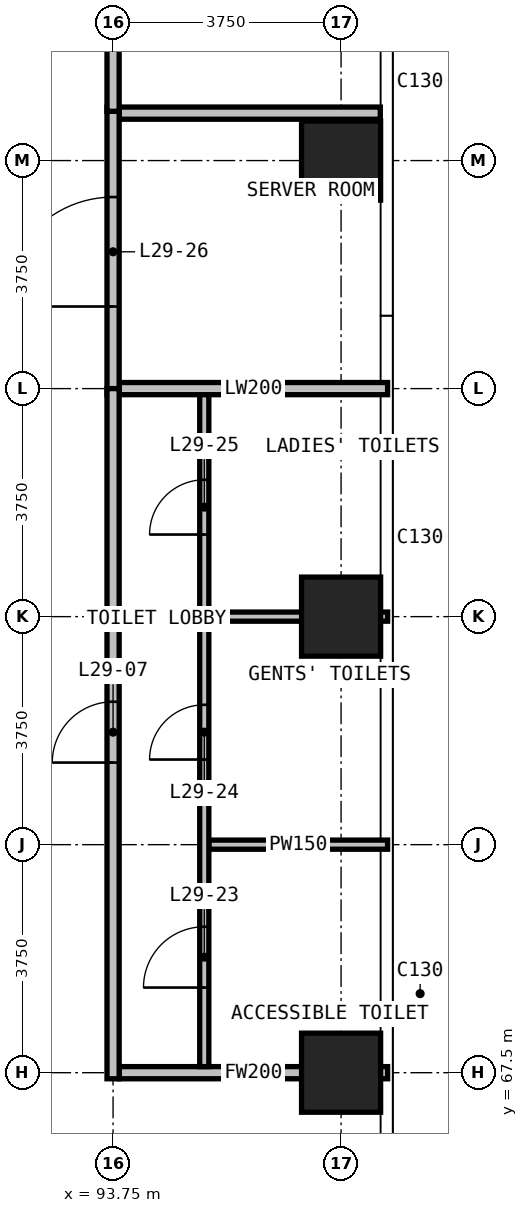
"""IFC4 building model, lengths in metres.
Left out: names, types, materials, properties, quantities, classifications, styles, units other than length and angle.
Written with IfcOpenShell. Run it as: python <this file> out.ifc"""

import sys

from ifc_helpers import new_model, si_unit, direction, frame, frame_2d, origin, origin_2d, place, context, subcontext, project, spatial, rectangle, extrude, element, fill, save


model = new_model("IFC4")
c1 = context("Model", 3, precision=1e-05, world=origin(), true_north=direction((0.0, 1.0)))
c2 = subcontext(c1, "Body", "Model", "MODEL_VIEW")
j1 = project(units=[si_unit("LENGTHUNIT", "METRE"), si_unit("PLANEANGLEUNIT", "RADIAN")], contexts=[c1])
p1 = place(None, origin())
s1 = spatial("IfcSite", under=j1, at=p1, CompositionType="ELEMENT")
p2 = place(p1, origin())
s2 = spatial("IfcBuilding", under=s1, at=p2, CompositionType="ELEMENT")
p3 = place(p2, frame((0.0, 0.0, 118.0)))
s3 = spatial("IfcBuildingStorey", under=s2, at=p3, CompositionType="ELEMENT", Elevation=118.0)
for number, where, z_axis, x_axis in (
    (1, (97.5, 67.5, 0.0), (0.0, 0.0, 1.0), (1.0, 0.0, 0.0)),
    (2, (97.5, 75.0, 0.0), (0.0, 0.0, 1.0), (1.0, 0.0, 0.0)),
    (3, (97.5, 82.5, 0.0), (0.0, 0.0, 1.0), (1.0, 0.0, 0.0)),
):
    element("IfcColumn", number, at=place(p3, frame(where, z_axis=z_axis, x_axis=x_axis)), inside=s3, PredefinedType="COLUMN", context=c2, shape_type="SweptSolid", body=[
        extrude(rectangle(XDim=1.3, YDim=1.3, at=origin_2d()), origin(), (0.0, 0.0, 1.0), 3.6),
    ])
p4 = place(p3, frame((93.85, 78.75, 0.0), z_axis=(0.0, 0.0, 1.0), x_axis=(1.0, 0.0, 0.0)))
e4 = element("IfcWall", 4, at=p4, inside=s3, PredefinedType="PARTITIONING", context=c2, shape_type="SweptSolid", body=[
    extrude(rectangle(XDim=4.415, YDim=0.2, at=frame_2d((2.208, 0.0))), origin(), (0.0, 0.0, 1.0), 3.3),
])
p5 = place(p3, frame((93.85, 83.28, 0.0), z_axis=(0.0, 0.0, 1.0), x_axis=(1.0, 0.0, 0.0)))
e5 = element("IfcWall", 5, at=p5, inside=s3, PredefinedType="PARTITIONING", context=c2, shape_type="SweptSolid", body=[
    extrude(rectangle(XDim=4.295, YDim=0.2, at=frame_2d((2.147, 0.0))), origin(), (0.0, 0.0, 1.0), 3.3),
])
p6 = place(p3, frame((93.75, 78.65, 0.0), z_axis=(0.0, 0.0, 1.0), x_axis=(0.0, 1.0, 0.0)))
e6 = element("IfcWall", 6, at=p6, inside=s3, PredefinedType="PARTITIONING", context=c2, shape_type="SweptSolid", body=[
    extrude(rectangle(XDim=4.73, YDim=0.2, at=frame_2d((2.365, 0.0))), origin(), (0.0, 0.0, 1.0), 3.3),
])
p7 = place(p6, frame((1.45, 0.0, 0.0)))
e7 = element("IfcOpeningElement", 7, at=p7, cuts=e6, PredefinedType="OPENING", context=c2, shape_type="SweptSolid", body=[
    extrude(rectangle(XDim=1.8, YDim=2.4, at=frame_2d((0.9, 1.2))), frame((0.0, 0.11, 0.0), z_axis=(0.0, -1.0, 0.0), x_axis=(1.0, 0.0, 0.0)), (0.0, 0.0, 1.0), 0.22),
])
p8 = place(p3, frame((93.85, 67.5, 0.0), z_axis=(0.0, 0.0, 1.0), x_axis=(1.0, 0.0, 0.0)))
e8 = element("IfcWall", 8, at=p8, inside=s3, PredefinedType="PARTITIONING", context=c2, shape_type="SweptSolid", body=[
    extrude(rectangle(XDim=4.415, YDim=0.2, at=frame_2d((2.208, 0.0))), origin(), (0.0, 0.0, 1.0), 3.3),
])
p9 = place(p3, frame((93.75, 67.4, 0.0), z_axis=(0.0, 0.0, 1.0), x_axis=(0.0, 1.0, 0.0)))
e9 = element("IfcWall", 9, at=p9, inside=s3, PredefinedType="PARTITIONING", context=c2, shape_type="SweptSolid", body=[
    extrude(rectangle(XDim=11.35, YDim=0.2, at=frame_2d((5.675, 0.0))), origin(), (0.0, 0.0, 1.0), 3.3),
])
p10 = place(p9, frame((5.2, 0.0, 0.0)))
e10 = element("IfcOpeningElement", 10, at=p10, cuts=e9, PredefinedType="OPENING", context=c2, shape_type="SweptSolid", body=[
    extrude(rectangle(XDim=1.0, YDim=2.2, at=frame_2d((0.5, 1.1))), frame((0.0, 0.11, 0.0), z_axis=(0.0, -1.0, 0.0), x_axis=(1.0, 0.0, 0.0)), (0.0, 0.0, 1.0), 0.22),
])
p11 = place(p3, frame((93.75, 83.31, 0.0), z_axis=(0.0, 0.0, 1.0), x_axis=(0.0, 1.0, 0.0)))
e11 = element("IfcWall", 11, at=p11, inside=s3, PredefinedType="PARTITIONING", context=c2, shape_type="SweptSolid", body=[
    extrude(rectangle(XDim=7.335, YDim=0.2, at=frame_2d((3.667, 0.0))), origin(), (0.0, 0.0, 1.0), 3.3),
])
for number, where, z_axis, x_axis in (
    (12, (95.325, 71.25, 0.0), (0.0, 0.0, 1.0), (1.0, 0.0, 0.0)),
    (13, (95.325, 75.0, 0.0), (0.0, 0.0, 1.0), (1.0, 0.0, 0.0)),
):
    element("IfcWall", number, at=place(p3, frame(where, z_axis=z_axis, x_axis=x_axis)), inside=s3, PredefinedType="PARTITIONING", context=c2, shape_type="SweptSolid", body=[
        extrude(rectangle(XDim=2.94, YDim=0.15, at=frame_2d((1.47, 0.0))), origin(), (0.0, 0.0, 1.0), 3.3),
    ])
p12 = place(p3, frame((95.25, 67.6, 0.0), z_axis=(0.0, 0.0, 1.0), x_axis=(0.0, 1.0, 0.0)))
e14 = element("IfcWall", 14, at=p12, inside=s3, PredefinedType="PARTITIONING", context=c2, shape_type="SweptSolid", body=[
    extrude(rectangle(XDim=11.05, YDim=0.15, at=frame_2d((5.525, 0.0))), origin(), (0.0, 0.0, 1.0), 3.3),
])
p13 = place(p12, frame((1.3, 0.0, 0.0)))
e15 = element("IfcOpeningElement", 15, at=p13, cuts=e14, PredefinedType="OPENING", context=c2, shape_type="SweptSolid", body=[
    extrude(rectangle(XDim=1.0, YDim=2.2, at=frame_2d((0.5, 1.1))), frame((0.0, 0.085, 0.0), z_axis=(0.0, -1.0, 0.0), x_axis=(1.0, 0.0, 0.0)), (0.0, 0.0, 1.0), 0.17),
])
p14 = place(p12, frame((5.05, 0.0, 0.0)))
e16 = element("IfcOpeningElement", 16, at=p14, cuts=e14, PredefinedType="OPENING", context=c2, shape_type="SweptSolid", body=[
    extrude(rectangle(XDim=0.9, YDim=2.2, at=frame_2d((0.45, 1.1))), frame((0.0, 0.085, 0.0), z_axis=(0.0, -1.0, 0.0), x_axis=(1.0, 0.0, 0.0)), (0.0, 0.0, 1.0), 0.17),
])
p15 = place(p12, frame((8.75, 0.0, 0.0)))
e17 = element("IfcOpeningElement", 17, at=p15, cuts=e14, PredefinedType="OPENING", context=c2, shape_type="SweptSolid", body=[
    extrude(rectangle(XDim=0.9, YDim=2.2, at=frame_2d((0.45, 1.1))), frame((0.0, 0.085, 0.0), z_axis=(0.0, -1.0, 0.0), x_axis=(1.0, 0.0, 0.0)), (0.0, 0.0, 1.0), 0.17),
])
p16 = place(p10, origin())
e18 = element("IfcDoor", 18, at=p16, inside=s3, OperationType="SINGLE_SWING_LEFT", PredefinedType="DOOR", context=c2, shape_type="SweptSolid", body=[
    extrude(rectangle(XDim=1.0, YDim=2.2, at=frame_2d((0.5, 1.1))), frame((0.0, 0.025, 0.0), z_axis=(0.0, -1.0, 0.0), x_axis=(1.0, 0.0, 0.0)), (0.0, 0.0, 1.0), 0.05),
])
fill(e10, e18)
p17 = place(p13, origin())
e19 = element("IfcDoor", 19, at=p17, inside=s3, OperationType="SINGLE_SWING_RIGHT", PredefinedType="DOOR", context=c2, shape_type="SweptSolid", body=[
    extrude(rectangle(XDim=1.0, YDim=2.2, at=frame_2d((0.5, 1.1))), frame((0.0, 0.025, 0.0), z_axis=(0.0, -1.0, 0.0), x_axis=(1.0, 0.0, 0.0)), (0.0, 0.0, 1.0), 0.05),
])
fill(e15, e19)
p18 = place(p14, origin())
e20 = element("IfcDoor", 20, at=p18, inside=s3, OperationType="SINGLE_SWING_LEFT", PredefinedType="DOOR", context=c2, shape_type="SweptSolid", body=[
    extrude(rectangle(XDim=0.9, YDim=2.2, at=frame_2d((0.45, 1.1))), frame((0.0, 0.025, 0.0), z_axis=(0.0, -1.0, 0.0), x_axis=(1.0, 0.0, 0.0)), (0.0, 0.0, 1.0), 0.05),
])
fill(e16, e20)
p19 = place(p15, origin())
e21 = element("IfcDoor", 21, at=p19, inside=s3, OperationType="SINGLE_SWING_RIGHT", PredefinedType="DOOR", context=c2, shape_type="SweptSolid", body=[
    extrude(rectangle(XDim=0.9, YDim=2.2, at=frame_2d((0.45, 1.1))), frame((0.0, 0.025, 0.0), z_axis=(0.0, -1.0, 0.0), x_axis=(1.0, 0.0, 0.0)), (0.0, 0.0, 1.0), 0.05),
])
fill(e17, e21)
p20 = place(p7, origin())
e22 = element("IfcDoor", 22, at=p20, inside=s3, OperationType="DOUBLE_DOOR_SINGLE_SWING", PredefinedType="DOOR", context=c2, shape_type="SweptSolid", body=[
    extrude(rectangle(XDim=1.8, YDim=2.4, at=frame_2d((0.9, 1.2))), frame((0.0, 0.025, 0.0), z_axis=(0.0, -1.0, 0.0), x_axis=(1.0, 0.0, 0.0)), (0.0, 0.0, 1.0), 0.05),
])
fill(e7, e22)
save(model, sys.argv[1])
